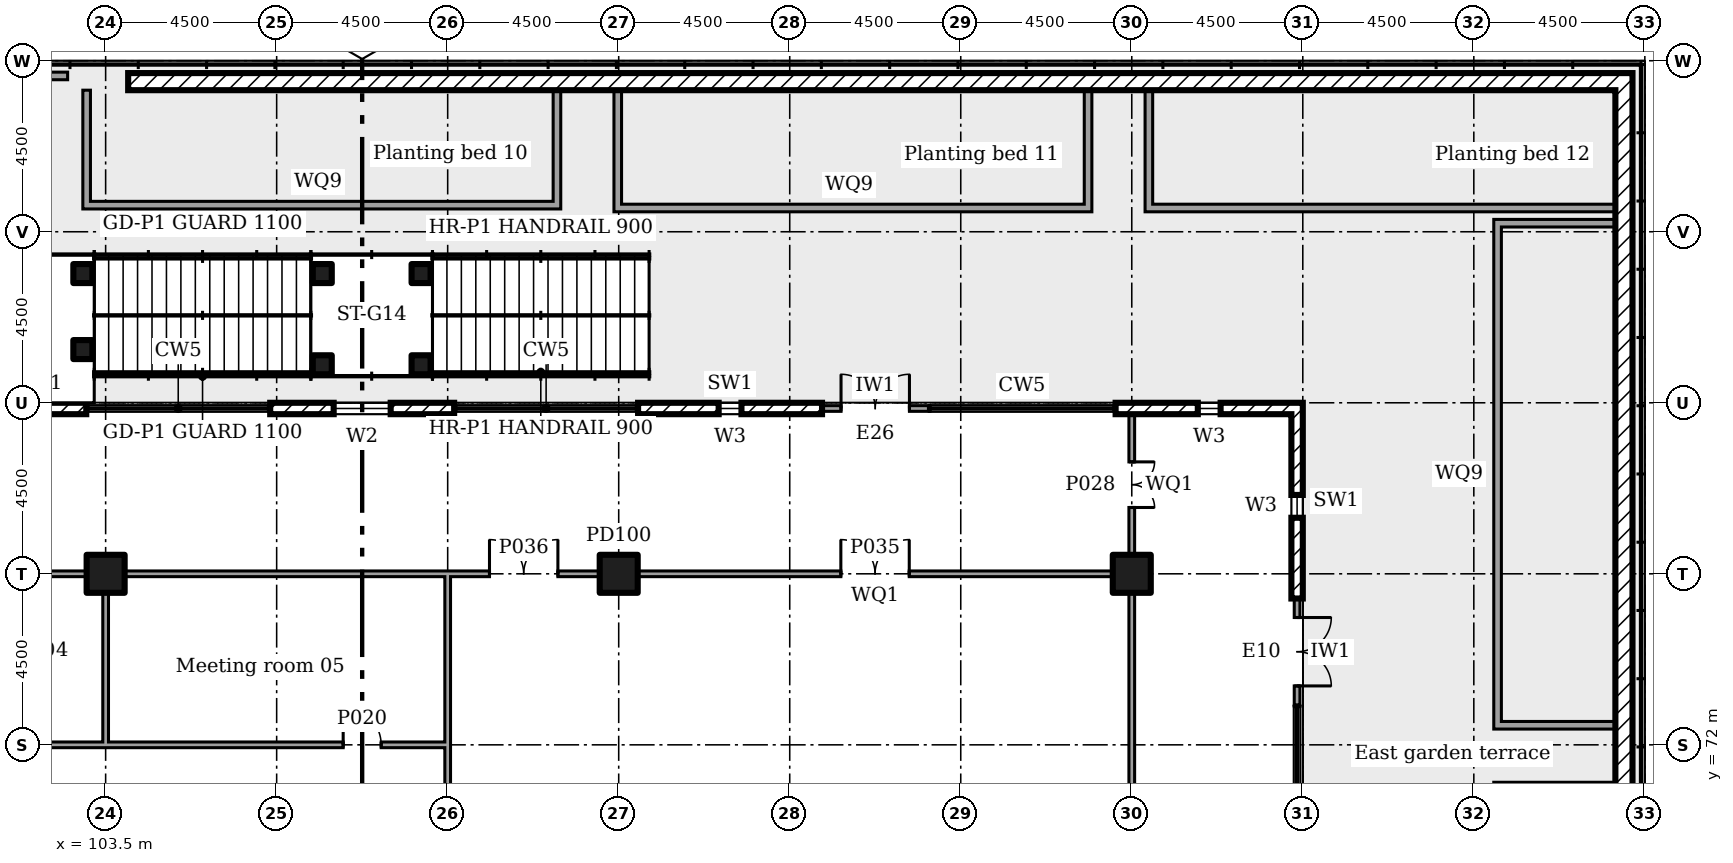
"""IFC4 building model, lengths in metres.
Left out: names, types, materials, properties, quantities, classifications, styles, units other than length and angle.
Written with IfcOpenShell. Run it as: python <this file> out.ifc"""

import sys

from ifc_helpers import new_model, si_unit, direction, frame, frame_2d, origin, origin_2d, place, context, subcontext, project, spatial, rectangle, extrude, element, fill, save


model = new_model("IFC4")
c1 = context("Model", 3, precision=1e-05, world=origin(), true_north=direction((0.0, 1.0)))
c2 = subcontext(c1, "Body", "Model", "MODEL_VIEW")
j1 = project(units=[si_unit("LENGTHUNIT", "METRE"), si_unit("PLANEANGLEUNIT", "RADIAN")], contexts=[c1])
p1 = place(None, origin())
s1 = spatial("IfcSite", under=j1, at=p1, CompositionType="ELEMENT")
p2 = place(p1, origin())
s2 = spatial("IfcBuilding", under=s1, at=p2, CompositionType="ELEMENT")
p3 = place(p2, frame((0.0, 0.0, 11.5)))
s3 = spatial("IfcBuildingStorey", under=s2, at=p3, CompositionType="ELEMENT", Elevation=11.5)
for number, where in (
    (1, (103.5, 76.5, 0.0)),
    (2, (117.0, 76.5, 0.0)),
    (3, (130.5, 76.5, 0.0)),
):
    element("IfcColumn", number, at=place(p3, frame(where)), inside=s3, PredefinedType="COLUMN", context=c2, shape_type="SweptSolid", body=[
        extrude(rectangle(XDim=1.0, YDim=1.0, at=origin_2d()), origin(), (0.0, 0.0, 1.0), 5.0),
    ])
p4 = place(p3, frame((134.85, 73.05, 0.0), z_axis=(0.0, 0.0, 1.0), x_axis=(0.0, 1.0, 0.0)))
e4 = element("IfcWall", 4, at=p4, inside=s3, PredefinedType="SOLIDWALL", context=c2, shape_type="SweptSolid", body=[
    extrude(rectangle(XDim=2.8, YDim=0.15, at=frame_2d((1.4, 0.0))), origin(), (0.0, 0.0, 1.0), 4.55),
])
p5 = place(p4, frame((0.5, 0.0, 0.0)))
e5 = element("IfcOpeningElement", 5, at=p5, cuts=e4, PredefinedType="OPENING", context=c2, shape_type="SweptSolid", body=[
    extrude(rectangle(XDim=1.8, YDim=2.4, at=frame_2d((0.9, 1.2))), frame((0.0, 0.085, 0.0), z_axis=(0.0, -1.0, 0.0), x_axis=(1.0, 0.0, 0.0)), (0.0, 0.0, 1.0), 0.17),
])
p6 = place(p3, frame((134.85, 75.85, 0.0), z_axis=(0.0, 0.0, 1.0), x_axis=(0.0, 1.0, 0.0)))
e6 = element("IfcWall", 6, at=p6, inside=s3, PredefinedType="ELEMENTEDWALL", context=c2, shape_type="SweptSolid", body=[
    extrude(rectangle(XDim=5.15, YDim=0.3, at=frame_2d((2.575, 0.0))), origin(), (0.0, 0.0, 1.0), 4.55),
])
p7 = place(p6, frame((2.125, 0.0, 0.45)))
e7 = element("IfcOpeningElement", 7, at=p7, cuts=e6, PredefinedType="OPENING", context=c2, shape_type="SweptSolid", body=[
    extrude(rectangle(XDim=0.6, YDim=2.4, at=frame_2d((0.3, 1.2))), frame((0.0, 0.16, 0.0), z_axis=(0.0, -1.0, 0.0), x_axis=(1.0, 0.0, 0.0)), (0.0, 0.0, 1.0), 0.32),
])
p8 = place(p3, frame((134.7, 80.85, 0.0), z_axis=(0.0, 0.0, 1.0), x_axis=(-1.0, 0.0, 0.0)))
e8 = element("IfcWall", 8, at=p8, inside=s3, PredefinedType="ELEMENTEDWALL", context=c2, shape_type="SweptSolid", body=[
    extrude(rectangle(XDim=4.625, YDim=0.3, at=frame_2d((2.312, 0.0))), origin(), (0.0, 0.0, 1.0), 4.55),
])
p9 = place(p8, frame((1.863, 0.0, 0.45)))
e9 = element("IfcOpeningElement", 9, at=p9, cuts=e8, PredefinedType="OPENING", context=c2, shape_type="SweptSolid", body=[
    extrude(rectangle(XDim=0.6, YDim=2.4, at=frame_2d((0.3, 1.2))), frame((0.0, 0.16, 0.0), z_axis=(0.0, -1.0, 0.0), x_axis=(1.0, 0.0, 0.0)), (0.0, 0.0, 1.0), 0.32),
])
p10 = place(p3, frame((125.15, 80.85, 0.0), z_axis=(0.0, 0.0, 1.0), x_axis=(-1.0, 0.0, 0.0)))
e10 = element("IfcWall", 10, at=p10, inside=s3, PredefinedType="SOLIDWALL", context=c2, shape_type="SweptSolid", body=[
    extrude(rectangle(XDim=2.8, YDim=0.15, at=frame_2d((1.4, 0.0))), origin(), (0.0, 0.0, 1.0), 4.55),
])
p11 = place(p10, frame((0.5, 0.0, 0.0)))
e11 = element("IfcOpeningElement", 11, at=p11, cuts=e10, PredefinedType="OPENING", context=c2, shape_type="SweptSolid", body=[
    extrude(rectangle(XDim=1.8, YDim=2.4, at=frame_2d((0.9, 1.2))), frame((0.0, 0.085, 0.0), z_axis=(0.0, -1.0, 0.0), x_axis=(1.0, 0.0, 0.0)), (0.0, 0.0, 1.0), 0.17),
])
p12 = place(p3, frame((122.35, 80.85, 0.0), z_axis=(0.0, 0.0, 1.0), x_axis=(-1.0, 0.0, 0.0)))
e12 = element("IfcWall", 12, at=p12, inside=s3, PredefinedType="ELEMENTEDWALL", context=c2, shape_type="SweptSolid", body=[
    extrude(rectangle(XDim=4.84, YDim=0.3, at=frame_2d((2.42, 0.0))), origin(), (0.0, 0.0, 1.0), 4.55),
])
p13 = place(p12, frame((2.12, 0.0, 0.45)))
e13 = element("IfcOpeningElement", 13, at=p13, cuts=e12, PredefinedType="OPENING", context=c2, shape_type="SweptSolid", body=[
    extrude(rectangle(XDim=0.6, YDim=2.4, at=frame_2d((0.3, 1.2))), frame((0.0, 0.16, 0.0), z_axis=(0.0, -1.0, 0.0), x_axis=(1.0, 0.0, 0.0)), (0.0, 0.0, 1.0), 0.32),
])
p14 = place(p3, frame((112.67, 80.85, 0.0), z_axis=(0.0, 0.0, 1.0), x_axis=(-1.0, 0.0, 0.0)))
e14 = element("IfcWall", 14, at=p14, inside=s3, PredefinedType="ELEMENTEDWALL", context=c2, shape_type="SweptSolid", body=[
    extrude(rectangle(XDim=4.84, YDim=0.3, at=frame_2d((2.42, 0.0))), origin(), (0.0, 0.0, 1.0), 4.55),
])
p15 = place(p14, frame((1.67, 0.0, 0.9)))
e15 = element("IfcOpeningElement", 15, at=p15, cuts=e14, PredefinedType="OPENING", context=c2, shape_type="SweptSolid", body=[
    extrude(rectangle(XDim=1.5, YDim=1.8, at=frame_2d((0.75, 0.9))), frame((0.0, 0.16, 0.0), z_axis=(0.0, -1.0, 0.0), x_axis=(1.0, 0.0, 0.0)), (0.0, 0.0, 1.0), 0.32),
])
p16 = place(p3, frame((102.99, 80.85, 0.0), z_axis=(0.0, 0.0, 1.0), x_axis=(-1.0, 0.0, 0.0)))
e16 = element("IfcWall", 16, at=p16, inside=s3, PredefinedType="ELEMENTEDWALL", context=c2, shape_type="SweptSolid", body=[
    extrude(rectangle(XDim=4.84, YDim=0.3, at=frame_2d((2.42, 0.0))), origin(), (0.0, 0.0, 1.0), 4.55),
])
p17 = place(p16, frame((2.12, 0.0, 0.45)))
e17 = element("IfcOpeningElement", 17, at=p17, cuts=e16, PredefinedType="OPENING", context=c2, shape_type="SweptSolid", body=[
    extrude(rectangle(XDim=0.6, YDim=2.4, at=frame_2d((0.3, 1.2))), frame((0.0, 0.16, 0.0), z_axis=(0.0, -1.0, 0.0), x_axis=(1.0, 0.0, 0.0)), (0.0, 0.0, 1.0), 0.32),
])
p18 = place(p3, frame((143.45, 9.775, 0.0), z_axis=(0.0, 0.0, 1.0), x_axis=(0.0, 1.0, 0.0)))
e18 = element("IfcWall", 18, at=p18, inside=s3, PredefinedType="SOLIDWALL", context=c2, shape_type="SweptSolid", body=[
    extrude(rectangle(XDim=79.9, YDim=0.45, at=frame_2d((39.95, 0.0))), origin(), (0.0, 0.0, 1.0), 0.6),
])
p19 = place(p3, frame((143.225, 89.45, 0.0), z_axis=(0.0, 0.0, 1.0), x_axis=(-1.0, 0.0, 0.0)))
e19 = element("IfcWall", 19, at=p19, inside=s3, PredefinedType="SOLIDWALL", context=c2, shape_type="SweptSolid", body=[
    extrude(rectangle(XDim=39.133, YDim=0.45, at=frame_2d((19.566, 0.0))), origin(), (0.0, 0.0, 1.0), 0.6),
])
p20 = place(p3, frame((115.375, 86.1, 0.0), z_axis=(0.0, 0.0, 1.0), x_axis=(0.0, 1.0, 0.0)))
e20 = element("IfcWall", 20, at=p20, inside=s3, PredefinedType="SOLIDWALL", context=c2, shape_type="SweptSolid", body=[
    extrude(rectangle(XDim=3.125, YDim=0.2, at=frame_2d((1.562, 0.0))), origin(), (0.0, 0.0, 1.0), 0.45),
])
p21 = place(p3, frame((102.9, 86.2, 0.0)))
e21 = element("IfcWall", 21, at=p21, inside=s3, PredefinedType="SOLIDWALL", context=c2, shape_type="SweptSolid", body=[
    extrude(rectangle(XDim=12.375, YDim=0.2, at=frame_2d((6.188, 0.0))), origin(), (0.0, 0.0, 1.0), 0.45),
])
p22 = place(p3, frame((103.0, 86.3, 0.0), z_axis=(0.0, 0.0, 1.0), x_axis=(0.0, 1.0, 0.0)))
e22 = element("IfcWall", 22, at=p22, inside=s3, PredefinedType="SOLIDWALL", context=c2, shape_type="SweptSolid", body=[
    extrude(rectangle(XDim=2.925, YDim=0.2, at=frame_2d((1.462, 0.0))), origin(), (0.0, 0.0, 1.0), 0.45),
])
p23 = place(p3, frame((129.35, 86.025, 0.0), z_axis=(0.0, 0.0, 1.0), x_axis=(0.0, 1.0, 0.0)))
e23 = element("IfcWall", 23, at=p23, inside=s3, PredefinedType="SOLIDWALL", context=c2, shape_type="SweptSolid", body=[
    extrude(rectangle(XDim=3.2, YDim=0.2, at=frame_2d((1.6, 0.0))), origin(), (0.0, 0.0, 1.0), 0.45),
])
p24 = place(p3, frame((116.875, 86.125, 0.0)))
e24 = element("IfcWall", 24, at=p24, inside=s3, PredefinedType="SOLIDWALL", context=c2, shape_type="SweptSolid", body=[
    extrude(rectangle(XDim=12.375, YDim=0.2, at=frame_2d((6.188, 0.0))), origin(), (0.0, 0.0, 1.0), 0.45),
])
p25 = place(p3, frame((116.975, 86.225, 0.0), z_axis=(0.0, 0.0, 1.0), x_axis=(0.0, 1.0, 0.0)))
e25 = element("IfcWall", 25, at=p25, inside=s3, PredefinedType="SOLIDWALL", context=c2, shape_type="SweptSolid", body=[
    extrude(rectangle(XDim=3.0, YDim=0.2, at=frame_2d((1.5, 0.0))), origin(), (0.0, 0.0, 1.0), 0.45),
])
p26 = place(p3, frame((130.85, 86.125, 0.0)))
e26 = element("IfcWall", 26, at=p26, inside=s3, PredefinedType="SOLIDWALL", context=c2, shape_type="SweptSolid", body=[
    extrude(rectangle(XDim=12.375, YDim=0.2, at=frame_2d((6.188, 0.0))), origin(), (0.0, 0.0, 1.0), 0.45),
])
p27 = place(p3, frame((130.95, 86.225, 0.0), z_axis=(0.0, 0.0, 1.0), x_axis=(0.0, 1.0, 0.0)))
e27 = element("IfcWall", 27, at=p27, inside=s3, PredefinedType="SOLIDWALL", context=c2, shape_type="SweptSolid", body=[
    extrude(rectangle(XDim=3.0, YDim=0.2, at=frame_2d((1.5, 0.0))), origin(), (0.0, 0.0, 1.0), 0.45),
])
for number, where in (
    (28, (140.025, 70.915, 0.0)),
    (29, (140.025, 85.725, 0.0)),
    (30, (140.025, 72.515, 0.0)),
):
    element("IfcWall", number, at=place(p3, frame(where)), inside=s3, PredefinedType="SOLIDWALL", context=c2, shape_type="SweptSolid", body=[
        extrude(rectangle(XDim=3.2, YDim=0.2, at=frame_2d((1.6, 0.0))), origin(), (0.0, 0.0, 1.0), 0.45),
    ])
p28 = place(p3, frame((140.125, 72.615, 0.0), z_axis=(0.0, 0.0, 1.0), x_axis=(0.0, 1.0, 0.0)))
e31 = element("IfcWall", 31, at=p28, inside=s3, PredefinedType="SOLIDWALL", context=c2, shape_type="SweptSolid", body=[
    extrude(rectangle(XDim=13.01, YDim=0.2, at=frame_2d((6.505, 0.0))), origin(), (0.0, 0.0, 1.0), 0.45),
])
p29 = place(p3, frame((130.5, 76.995, 0.0), z_axis=(0.0, 0.0, 1.0), x_axis=(0.0, 1.0, 0.0)))
e32 = element("IfcWall", 32, at=p29, inside=s3, PredefinedType="PARTITIONING", context=c2, shape_type="SweptSolid", body=[
    extrude(rectangle(XDim=3.705, YDim=0.15, at=frame_2d((1.853, 0.0))), origin(), (0.0, 0.0, 1.0), 4.55),
])
p30 = place(p29, frame((1.25, 0.0, 0.0)))
e33 = element("IfcOpeningElement", 33, at=p30, cuts=e32, PredefinedType="OPENING", context=c2, shape_type="SweptSolid", body=[
    extrude(rectangle(XDim=1.2, YDim=2.1, at=frame_2d((0.6, 1.05))), frame((0.0, 0.085, 0.0), z_axis=(0.0, -1.0, 0.0), x_axis=(1.0, 0.0, 0.0)), (0.0, 0.0, 1.0), 0.17),
])
p31 = place(p3, frame((130.5, 58.5, 0.0), z_axis=(0.0, 0.0, 1.0), x_axis=(0.0, 1.0, 0.0)))
e34 = element("IfcWall", 34, at=p31, inside=s3, PredefinedType="PARTITIONING", context=c2, shape_type="SweptSolid", body=[
    extrude(rectangle(XDim=17.505, YDim=0.15, at=frame_2d((8.752, 0.0))), origin(), (0.0, 0.0, 1.0), 4.55),
])
p32 = place(p31, frame((7.85, 0.0, 0.0)))
e35 = element("IfcOpeningElement", 35, at=p32, cuts=e34, PredefinedType="OPENING", context=c2, shape_type="SweptSolid", body=[
    extrude(rectangle(XDim=1.8, YDim=2.1, at=frame_2d((0.9, 1.05))), frame((0.0, 0.085, 0.0), z_axis=(0.0, -1.0, 0.0), x_axis=(1.0, 0.0, 0.0)), (0.0, 0.0, 1.0), 0.17),
])
p33 = place(p3, frame((94.5, 76.5, 0.0)))
e36 = element("IfcWall", 36, at=p33, inside=s3, PredefinedType="PARTITIONING", context=c2, shape_type="SweptSolid", body=[
    extrude(rectangle(XDim=8.505, YDim=0.15, at=frame_2d((4.252, 0.0))), origin(), (0.0, 0.0, 1.0), 4.55),
])
p34 = place(p3, frame((103.995, 76.5, 0.0)))
e37 = element("IfcWall", 37, at=p34, inside=s3, PredefinedType="PARTITIONING", context=c2, shape_type="SweptSolid", body=[
    extrude(rectangle(XDim=8.58, YDim=0.15, at=frame_2d((4.29, 0.0))), origin(), (0.0, 0.0, 1.0), 4.55),
])
p35 = place(p3, frame((112.5, 76.5, 0.0)))
e38 = element("IfcWall", 38, at=p35, inside=s3, PredefinedType="PARTITIONING", context=c2, shape_type="SweptSolid", body=[
    extrude(rectangle(XDim=4.005, YDim=0.15, at=frame_2d((2.002, 0.0))), origin(), (0.0, 0.0, 1.0), 4.55),
])
p36 = place(p35, frame((1.1, 0.0, 0.0)))
e39 = element("IfcOpeningElement", 39, at=p36, cuts=e38, PredefinedType="OPENING", context=c2, shape_type="SweptSolid", body=[
    extrude(rectangle(XDim=1.8, YDim=2.1, at=frame_2d((0.9, 1.05))), frame((0.0, 0.085, 0.0), z_axis=(0.0, -1.0, 0.0), x_axis=(1.0, 0.0, 0.0)), (0.0, 0.0, 1.0), 0.17),
])
p37 = place(p3, frame((117.495, 76.5, 0.0)))
e40 = element("IfcWall", 40, at=p37, inside=s3, PredefinedType="PARTITIONING", context=c2, shape_type="SweptSolid", body=[
    extrude(rectangle(XDim=12.51, YDim=0.15, at=frame_2d((6.255, 0.0))), origin(), (0.0, 0.0, 1.0), 4.55),
])
p38 = place(p37, frame((5.35, 0.0, 0.0)))
e41 = element("IfcOpeningElement", 41, at=p38, cuts=e40, PredefinedType="OPENING", context=c2, shape_type="SweptSolid", body=[
    extrude(rectangle(XDim=1.8, YDim=2.1, at=frame_2d((0.9, 1.05))), frame((0.0, 0.085, 0.0), z_axis=(0.0, -1.0, 0.0), x_axis=(1.0, 0.0, 0.0)), (0.0, 0.0, 1.0), 0.17),
])
p39 = place(p3, frame((94.575, 72.0, 0.0)))
e42 = element("IfcWall", 42, at=p39, inside=s3, PredefinedType="PARTITIONING", context=c2, shape_type="SweptSolid", body=[
    extrude(rectangle(XDim=9.0, YDim=0.15, at=frame_2d((4.5, 0.0))), origin(), (0.0, 0.0, 1.0), 4.55),
])
p40 = place(p39, frame((3.925, 0.0, 0.0)))
e43 = element("IfcOpeningElement", 43, at=p40, cuts=e42, PredefinedType="OPENING", context=c2, shape_type="SweptSolid", body=[
    extrude(rectangle(XDim=1.0, YDim=2.1, at=frame_2d((0.5, 1.05))), frame((0.0, 0.085, 0.0), z_axis=(0.0, -1.0, 0.0), x_axis=(1.0, 0.0, 0.0)), (0.0, 0.0, 1.0), 0.17),
])
p41 = place(p3, frame((103.5, 72.0, 0.0)))
e44 = element("IfcWall", 44, at=p41, inside=s3, PredefinedType="PARTITIONING", context=c2, shape_type="SweptSolid", body=[
    extrude(rectangle(XDim=9.075, YDim=0.15, at=frame_2d((4.538, 0.0))), origin(), (0.0, 0.0, 1.0), 4.55),
])
p42 = place(p41, frame((6.25, 0.0, 0.0)))
e45 = element("IfcOpeningElement", 45, at=p42, cuts=e44, PredefinedType="OPENING", context=c2, shape_type="SweptSolid", body=[
    extrude(rectangle(XDim=1.0, YDim=2.1, at=frame_2d((0.5, 1.05))), frame((0.0, 0.085, 0.0), z_axis=(0.0, -1.0, 0.0), x_axis=(1.0, 0.0, 0.0)), (0.0, 0.0, 1.0), 0.17),
])
p43 = place(p3, frame((112.5, 59.495, 0.0), z_axis=(0.0, 0.0, 1.0), x_axis=(0.0, 1.0, 0.0)))
e46 = element("IfcWall", 46, at=p43, inside=s3, PredefinedType="PARTITIONING", context=c2, shape_type="SweptSolid", body=[
    extrude(rectangle(XDim=12.43, YDim=0.15, at=frame_2d((6.215, 0.0))), origin(), (0.0, 0.0, 1.0), 4.55),
])
p44 = place(p43, frame((5.35, 0.0, 0.0)))
e47 = element("IfcOpeningElement", 47, at=p44, cuts=e46, PredefinedType="OPENING", context=c2, shape_type="SweptSolid", body=[
    extrude(rectangle(XDim=1.8, YDim=2.1, at=frame_2d((0.9, 1.05))), frame((0.0, 0.085, 0.0), z_axis=(0.0, -1.0, 0.0), x_axis=(1.0, 0.0, 0.0)), (0.0, 0.0, 1.0), 0.17),
])
p45 = place(p3, frame((103.5, 72.075, 0.0), z_axis=(0.0, 0.0, 1.0), x_axis=(0.0, 1.0, 0.0)))
e48 = element("IfcWall", 48, at=p45, inside=s3, PredefinedType="PARTITIONING", context=c2, shape_type="SweptSolid", body=[
    extrude(rectangle(XDim=3.93, YDim=0.15, at=frame_2d((1.965, 0.0))), origin(), (0.0, 0.0, 1.0), 4.55),
])
p46 = place(p3, frame((112.5, 72.0, 0.0), z_axis=(0.0, 0.0, 1.0), x_axis=(0.0, 1.0, 0.0)))
e49 = element("IfcWall", 49, at=p46, inside=s3, PredefinedType="PARTITIONING", context=c2, shape_type="SweptSolid", body=[
    extrude(rectangle(XDim=4.425, YDim=0.15, at=frame_2d((2.212, 0.0))), origin(), (0.0, 0.0, 1.0), 4.55),
])
p47 = place(p3, frame((98.7, 89.6, 0.0)))
e50 = element("IfcWall", 50, at=p47, inside=s3, PredefinedType="SOLIDWALL", context=c2, shape_type="SweptSolid", body=[
    extrude(rectangle(XDim=3.8, YDim=0.2, at=frame_2d((1.9, 0.0))), origin(), (0.0, 0.0, 1.0), 2.3),
])
p48 = place(p47, frame((0.6, 0.0, 0.0)))
e51 = element("IfcOpeningElement", 51, at=p48, cuts=e50, PredefinedType="OPENING", context=c2, shape_type="SweptSolid", body=[
    extrude(rectangle(XDim=2.6, YDim=2.1, at=frame_2d((1.3, 1.05))), frame((0.0, 0.11, 0.0), z_axis=(0.0, -1.0, 0.0), x_axis=(1.0, 0.0, 0.0)), (0.0, 0.0, 1.0), 0.22),
])
for number, where in (
    (52, (102.9, 82.4, 0.0)),
    (53, (102.9, 84.4, 0.0)),
):
    element("IfcColumn", number, at=place(p3, frame(where)), inside=s3, PredefinedType="COLUMN", context=c2, shape_type="SweptSolid", body=[
        extrude(rectangle(XDim=0.5, YDim=0.5, at=origin_2d()), origin(), (0.0, 0.0, 1.0), 4.75),
    ])
for number, where in (
    (54, (109.2, 82.0, 0.0)),
    (55, (109.2, 84.4, 0.0)),
    (56, (111.8, 82.0, 0.0)),
    (57, (111.8, 84.4, 0.0)),
):
    element("IfcColumn", number, at=place(p3, frame(where)), inside=s3, PredefinedType="COLUMN", context=c2, shape_type="SweptSolid", body=[
        extrude(rectangle(XDim=0.5, YDim=0.5, at=origin_2d()), origin(), (0.0, 0.0, 1.0), 2.25),
    ])
p49 = place(p5, frame((1.8, 0.0, 0.0), x_axis=(-1.0, 0.0, 0.0)))
e58 = element("IfcDoor", 58, at=p49, inside=s3, OperationType="DOUBLE_DOOR_DOUBLE_SWING", PredefinedType="NOTDEFINED", context=c2, shape_type="SweptSolid", body=[
    extrude(rectangle(XDim=1.8, YDim=2.4, at=frame_2d((0.9, 1.2))), frame((0.0, 0.025, 0.0), z_axis=(0.0, -1.0, 0.0), x_axis=(1.0, 0.0, 0.0)), (0.0, 0.0, 1.0), 0.05),
])
fill(e5, e58)
p50 = place(p7, origin())
e59 = element("IfcWindow", 59, at=p50, inside=s3, PartitioningType="SINGLE_PANEL", PredefinedType="WINDOW", context=c2, shape_type="SweptSolid", body=[
    extrude(rectangle(XDim=0.6, YDim=2.4, at=frame_2d((0.3, 1.2))), frame((0.0, 0.03, 0.0), z_axis=(0.0, -1.0, 0.0), x_axis=(1.0, 0.0, 0.0)), (0.0, 0.0, 1.0), 0.06),
])
fill(e7, e59)
p51 = place(p9, origin())
e60 = element("IfcWindow", 60, at=p51, inside=s3, PartitioningType="SINGLE_PANEL", PredefinedType="WINDOW", context=c2, shape_type="SweptSolid", body=[
    extrude(rectangle(XDim=0.6, YDim=2.4, at=frame_2d((0.3, 1.2))), frame((0.0, 0.03, 0.0), z_axis=(0.0, -1.0, 0.0), x_axis=(1.0, 0.0, 0.0)), (0.0, 0.0, 1.0), 0.06),
])
fill(e9, e60)
p52 = place(p11, frame((1.8, 0.0, 0.0), x_axis=(-1.0, 0.0, 0.0)))
e61 = element("IfcDoor", 61, at=p52, inside=s3, OperationType="DOUBLE_DOOR_DOUBLE_SWING", PredefinedType="NOTDEFINED", context=c2, shape_type="SweptSolid", body=[
    extrude(rectangle(XDim=1.8, YDim=2.4, at=frame_2d((0.9, 1.2))), frame((0.0, 0.025, 0.0), z_axis=(0.0, -1.0, 0.0), x_axis=(1.0, 0.0, 0.0)), (0.0, 0.0, 1.0), 0.05),
])
fill(e11, e61)
p53 = place(p13, origin())
e62 = element("IfcWindow", 62, at=p53, inside=s3, PartitioningType="SINGLE_PANEL", PredefinedType="WINDOW", context=c2, shape_type="SweptSolid", body=[
    extrude(rectangle(XDim=0.6, YDim=2.4, at=frame_2d((0.3, 1.2))), frame((0.0, 0.03, 0.0), z_axis=(0.0, -1.0, 0.0), x_axis=(1.0, 0.0, 0.0)), (0.0, 0.0, 1.0), 0.06),
])
fill(e13, e62)
p54 = place(p15, origin())
e63 = element("IfcWindow", 63, at=p54, inside=s3, PartitioningType="SINGLE_PANEL", PredefinedType="WINDOW", context=c2, shape_type="SweptSolid", body=[
    extrude(rectangle(XDim=1.5, YDim=1.8, at=frame_2d((0.75, 0.9))), frame((0.0, 0.03, 0.0), z_axis=(0.0, -1.0, 0.0), x_axis=(1.0, 0.0, 0.0)), (0.0, 0.0, 1.0), 0.06),
])
fill(e15, e63)
p55 = place(p42, origin())
e64 = element("IfcDoor", 64, at=p55, inside=s3, OperationType="SINGLE_SWING_RIGHT", PredefinedType="DOOR", context=c2, shape_type="SweptSolid", body=[
    extrude(rectangle(XDim=1.0, YDim=2.1, at=frame_2d((0.5, 1.05))), frame((0.0, 0.025, 0.0), z_axis=(0.0, -1.0, 0.0), x_axis=(1.0, 0.0, 0.0)), (0.0, 0.0, 1.0), 0.05),
])
fill(e45, e64)
p56 = place(p30, frame((1.2, 0.0, 0.0), x_axis=(-1.0, 0.0, 0.0)))
e65 = element("IfcDoor", 65, at=p56, inside=s3, OperationType="DOUBLE_DOOR_SINGLE_SWING", PredefinedType="DOOR", context=c2, shape_type="SweptSolid", body=[
    extrude(rectangle(XDim=1.2, YDim=2.1, at=frame_2d((0.6, 1.05))), frame((0.0, 0.025, 0.0), z_axis=(0.0, -1.0, 0.0), x_axis=(1.0, 0.0, 0.0)), (0.0, 0.0, 1.0), 0.05),
])
fill(e33, e65)
p57 = place(p38, origin())
e66 = element("IfcDoor", 66, at=p57, inside=s3, OperationType="DOUBLE_DOOR_SINGLE_SWING", PredefinedType="DOOR", context=c2, shape_type="SweptSolid", body=[
    extrude(rectangle(XDim=1.8, YDim=2.1, at=frame_2d((0.9, 1.05))), frame((0.0, 0.025, 0.0), z_axis=(0.0, -1.0, 0.0), x_axis=(1.0, 0.0, 0.0)), (0.0, 0.0, 1.0), 0.05),
])
fill(e41, e66)
p58 = place(p36, origin())
e67 = element("IfcDoor", 67, at=p58, inside=s3, OperationType="DOUBLE_DOOR_SINGLE_SWING", PredefinedType="DOOR", context=c2, shape_type="SweptSolid", body=[
    extrude(rectangle(XDim=1.8, YDim=2.1, at=frame_2d((0.9, 1.05))), frame((0.0, 0.025, 0.0), z_axis=(0.0, -1.0, 0.0), x_axis=(1.0, 0.0, 0.0)), (0.0, 0.0, 1.0), 0.05),
])
fill(e39, e67)
save(model, sys.argv[1])
